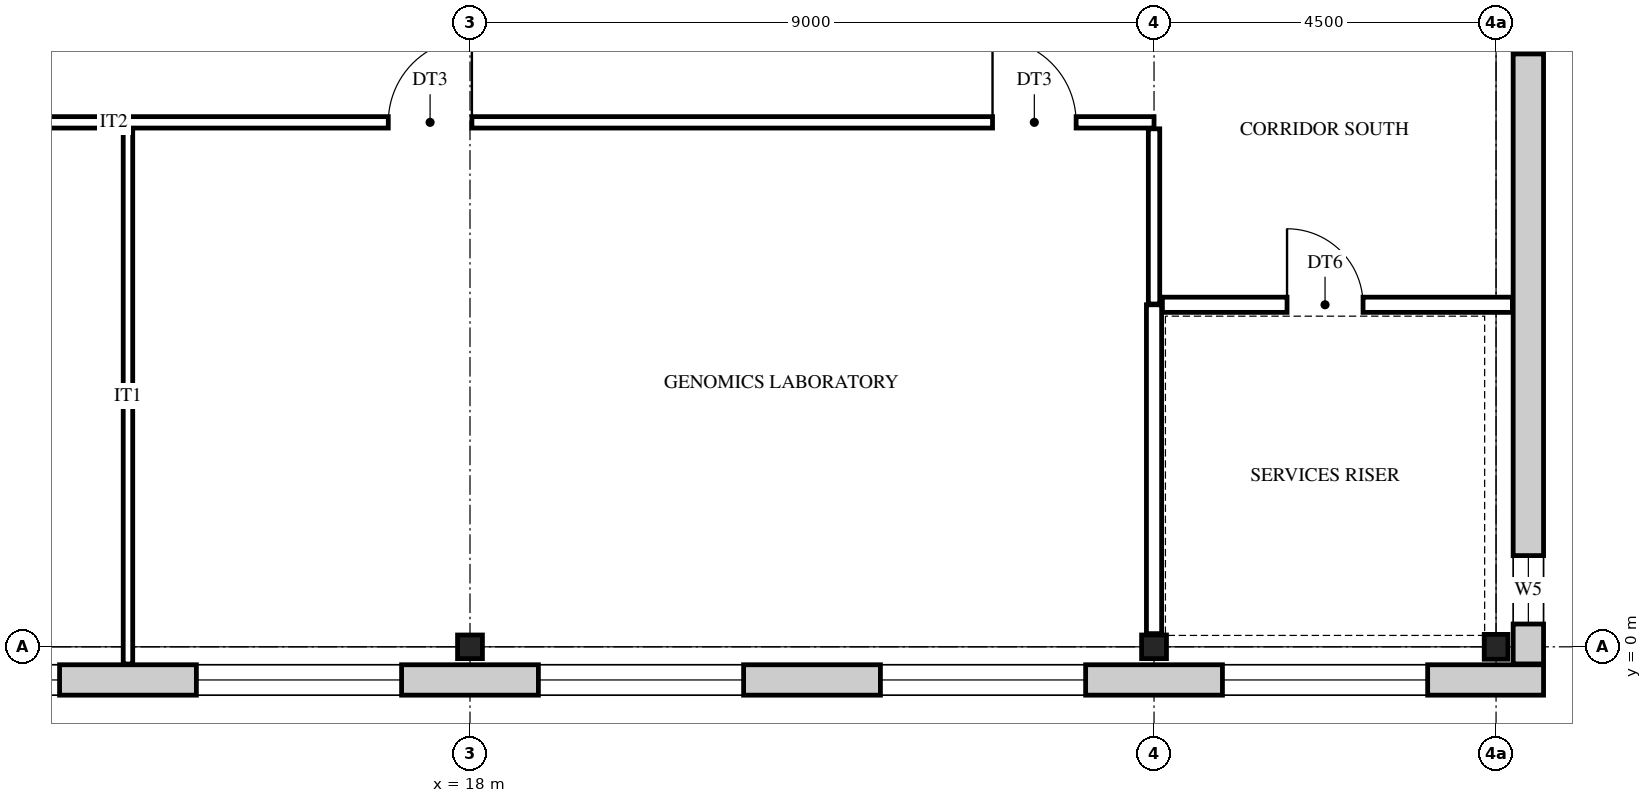
"""IFC4 building model, lengths in metres.
Left out: names, types, materials, properties, quantities, classifications, styles, units other than length and angle.
Written with IfcOpenShell. Run it as: python <this file> out.ifc"""

import sys

from ifc_helpers import new_model, si_unit, direction, frame, frame_2d, origin, origin_2d, place, context, subcontext, project, spatial, rectangle, i_section, extrude, element, fill, save


model = new_model("IFC4")
c1 = context("Model", 3, precision=1e-05, world=origin(), true_north=direction((0.0, 1.0)))
c2 = subcontext(c1, "Body", "Model", "MODEL_VIEW")
j1 = project(units=[si_unit("LENGTHUNIT", "METRE"), si_unit("PLANEANGLEUNIT", "RADIAN")], contexts=[c1])
p1 = place(None, origin())
s1 = spatial("IfcSite", under=j1, at=p1, CompositionType="ELEMENT")
p2 = place(p1, origin())
s2 = spatial("IfcBuilding", under=s1, at=p2, CompositionType="ELEMENT")
p3 = place(p2, frame((0.0, 0.0, 36.0)))
s3 = spatial("IfcBuildingStorey", under=s2, at=p3, CompositionType="ELEMENT", Elevation=36.0)
for number, where, z_axis, x_axis in (
    (1, (18.0, 0.0, 0.0), (0.0, 0.0, 1.0), (0.0, 1.0, 0.0)),
    (2, (27.0, 0.0, 0.0), (0.0, 0.0, 1.0), (0.0, 1.0, 0.0)),
    (3, (31.5, 0.0, 0.0), (0.0, 0.0, 1.0), (1.0, 0.0, 0.0)),
):
    element("IfcColumn", number, at=place(p3, frame(where, z_axis=z_axis, x_axis=x_axis)), inside=s3, PredefinedType="COLUMN", context=c2, shape_type="SweptSolid", body=[
        extrude(i_section(OverallWidth=0.311, OverallDepth=0.327, WebThickness=0.016, FlangeThickness=0.025, FilletRadius=0.017, at=origin_2d()), origin(), (0.0, 0.0, 1.0), 4.2),
    ])
p4 = place(p3, frame((32.125, -0.436, 0.0), z_axis=(0.0, 0.0, 1.0), x_axis=(-1.0, 0.0, 0.0)))
e4 = element("IfcWall", 4, at=p4, inside=s3, PredefinedType="STANDARD", context=c2, shape_type="SweptSolid", body=[
    extrude(rectangle(XDim=32.75, YDim=0.4, at=frame_2d((16.375, 0.0))), origin(), (0.0, 0.0, 1.0), 4.2),
])
p5 = place(p4, frame((28.525, 0.0, 0.9)))
e5 = element("IfcOpeningElement", 5, at=p5, cuts=e4, PredefinedType="OPENING", context=c2, shape_type="SweptSolid", body=[
    extrude(rectangle(XDim=2.7, YDim=2.5, at=frame_2d((1.35, 1.25))), frame((0.0, 0.21, 0.0), z_axis=(0.0, -1.0, 0.0), x_axis=(1.0, 0.0, 0.0)), (0.0, 0.0, 1.0), 0.42),
])
p6 = place(p4, frame((24.025, 0.0, 0.9)))
e6 = element("IfcOpeningElement", 6, at=p6, cuts=e4, PredefinedType="OPENING", context=c2, shape_type="SweptSolid", body=[
    extrude(rectangle(XDim=2.7, YDim=2.5, at=frame_2d((1.35, 1.25))), frame((0.0, 0.21, 0.0), z_axis=(0.0, -1.0, 0.0), x_axis=(1.0, 0.0, 0.0)), (0.0, 0.0, 1.0), 0.42),
])
p7 = place(p4, frame((19.525, 0.0, 0.9)))
e7 = element("IfcOpeningElement", 7, at=p7, cuts=e4, PredefinedType="OPENING", context=c2, shape_type="SweptSolid", body=[
    extrude(rectangle(XDim=2.7, YDim=2.5, at=frame_2d((1.35, 1.25))), frame((0.0, 0.21, 0.0), z_axis=(0.0, -1.0, 0.0), x_axis=(1.0, 0.0, 0.0)), (0.0, 0.0, 1.0), 0.42),
])
p8 = place(p4, frame((15.025, 0.0, 0.9)))
e8 = element("IfcOpeningElement", 8, at=p8, cuts=e4, PredefinedType="OPENING", context=c2, shape_type="SweptSolid", body=[
    extrude(rectangle(XDim=2.7, YDim=2.5, at=frame_2d((1.35, 1.25))), frame((0.0, 0.21, 0.0), z_axis=(0.0, -1.0, 0.0), x_axis=(1.0, 0.0, 0.0)), (0.0, 0.0, 1.0), 0.42),
])
p9 = place(p4, frame((10.525, 0.0, 0.9)))
e9 = element("IfcOpeningElement", 9, at=p9, cuts=e4, PredefinedType="OPENING", context=c2, shape_type="SweptSolid", body=[
    extrude(rectangle(XDim=2.7, YDim=2.5, at=frame_2d((1.35, 1.25))), frame((0.0, 0.21, 0.0), z_axis=(0.0, -1.0, 0.0), x_axis=(1.0, 0.0, 0.0)), (0.0, 0.0, 1.0), 0.42),
])
p10 = place(p4, frame((6.025, 0.0, 0.9)))
e10 = element("IfcOpeningElement", 10, at=p10, cuts=e4, PredefinedType="OPENING", context=c2, shape_type="SweptSolid", body=[
    extrude(rectangle(XDim=2.7, YDim=2.5, at=frame_2d((1.35, 1.25))), frame((0.0, 0.21, 0.0), z_axis=(0.0, -1.0, 0.0), x_axis=(1.0, 0.0, 0.0)), (0.0, 0.0, 1.0), 0.42),
])
p11 = place(p4, frame((1.525, 0.0, 0.9)))
e11 = element("IfcOpeningElement", 11, at=p11, cuts=e4, PredefinedType="OPENING", context=c2, shape_type="SweptSolid", body=[
    extrude(rectangle(XDim=2.7, YDim=2.5, at=frame_2d((1.35, 1.25))), frame((0.0, 0.21, 0.0), z_axis=(0.0, -1.0, 0.0), x_axis=(1.0, 0.0, 0.0)), (0.0, 0.0, 1.0), 0.42),
])
p12 = place(p3, frame((31.925, 27.225, 0.0), z_axis=(0.0, 0.0, 1.0), x_axis=(0.0, -1.0, 0.0)))
e12 = element("IfcWall", 12, at=p12, inside=s3, PredefinedType="STANDARD", context=c2, shape_type="SweptSolid", body=[
    extrude(rectangle(XDim=27.45, YDim=0.4, at=frame_2d((13.725, 0.0))), origin(), (0.0, 0.0, 1.0), 4.2),
])
p13 = place(p12, frame((26.025, 0.0, 0.9)))
e13 = element("IfcOpeningElement", 13, at=p13, cuts=e12, PredefinedType="OPENING", context=c2, shape_type="SweptSolid", body=[
    extrude(rectangle(XDim=0.9, YDim=2.0, at=frame_2d((0.45, 1.0))), frame((0.0, 0.21, 0.0), z_axis=(0.0, -1.0, 0.0), x_axis=(1.0, 0.0, 0.0)), (0.0, 0.0, 1.0), 0.42),
])
p14 = place(p12, frame((18.525, 0.0, 0.9)))
e14 = element("IfcOpeningElement", 14, at=p14, cuts=e12, PredefinedType="OPENING", context=c2, shape_type="SweptSolid", body=[
    extrude(rectangle(XDim=0.9, YDim=2.0, at=frame_2d((0.45, 1.0))), frame((0.0, 0.21, 0.0), z_axis=(0.0, -1.0, 0.0), x_axis=(1.0, 0.0, 0.0)), (0.0, 0.0, 1.0), 0.42),
])
p15 = place(p12, frame((15.675, 0.0, 1.6)))
e15 = element("IfcOpeningElement", 15, at=p15, cuts=e12, PredefinedType="OPENING", context=c2, shape_type="SweptSolid", body=[
    extrude(rectangle(XDim=0.6, YDim=0.9, at=frame_2d((0.3, 0.45))), frame((0.0, 0.21, 0.0), z_axis=(0.0, -1.0, 0.0), x_axis=(1.0, 0.0, 0.0)), (0.0, 0.0, 1.0), 0.42),
])
p16 = place(p12, frame((11.175, 0.0, 1.6)))
e16 = element("IfcOpeningElement", 16, at=p16, cuts=e12, PredefinedType="OPENING", context=c2, shape_type="SweptSolid", body=[
    extrude(rectangle(XDim=0.6, YDim=0.9, at=frame_2d((0.3, 0.45))), frame((0.0, 0.21, 0.0), z_axis=(0.0, -1.0, 0.0), x_axis=(1.0, 0.0, 0.0)), (0.0, 0.0, 1.0), 0.42),
])
p17 = place(p12, frame((8.025, 0.0, 0.9)))
e17 = element("IfcOpeningElement", 17, at=p17, cuts=e12, PredefinedType="OPENING", context=c2, shape_type="SweptSolid", body=[
    extrude(rectangle(XDim=0.9, YDim=2.0, at=frame_2d((0.45, 1.0))), frame((0.0, 0.21, 0.0), z_axis=(0.0, -1.0, 0.0), x_axis=(1.0, 0.0, 0.0)), (0.0, 0.0, 1.0), 0.42),
])
p18 = place(p12, frame((0.525, 0.0, 0.9)))
e18 = element("IfcOpeningElement", 18, at=p18, cuts=e12, PredefinedType="OPENING", context=c2, shape_type="SweptSolid", body=[
    extrude(rectangle(XDim=0.9, YDim=2.0, at=frame_2d((0.45, 1.0))), frame((0.0, 0.21, 0.0), z_axis=(0.0, -1.0, 0.0), x_axis=(1.0, 0.0, 0.0)), (0.0, 0.0, 1.0), 0.42),
])
p19 = place(p3, frame((13.5, -0.226, 0.0), z_axis=(0.0, 0.0, 1.0), x_axis=(0.0, 1.0, 0.0)))
e19 = element("IfcWall", 19, at=p19, inside=s3, PredefinedType="PARTITIONING", context=c2, shape_type="SweptSolid", body=[
    extrude(rectangle(XDim=7.041, YDim=0.125, at=frame_2d((3.521, 0.0))), origin(), (0.0, 0.0, 1.0), 3.537),
])
p20 = place(p3, frame((27.0, 0.174, 0.0), z_axis=(0.0, 0.0, 1.0), x_axis=(0.0, 1.0, 0.0)))
e20 = element("IfcWall", 20, at=p20, inside=s3, PredefinedType="PARTITIONING", context=c2, shape_type="SweptSolid", body=[
    extrude(rectangle(XDim=4.326, YDim=0.2, at=frame_2d((2.163, 0.0))), origin(), (0.0, 0.0, 1.0), 3.537),
])
p21 = place(p3, frame((27.0, 4.51, 0.0), z_axis=(0.0, 0.0, 1.0), x_axis=(0.0, 1.0, 0.0)))
e21 = element("IfcWall", 21, at=p21, inside=s3, PredefinedType="PARTITIONING", context=c2, shape_type="SweptSolid", body=[
    extrude(rectangle(XDim=2.305, YDim=0.15, at=frame_2d((1.152, 0.0))), origin(), (0.0, 0.0, 1.0), 3.537),
])
p22 = place(p3, frame((27.11, 4.5, 0.0), z_axis=(0.0, 0.0, 1.0), x_axis=(1.0, 0.0, 0.0)))
e22 = element("IfcWall", 22, at=p22, inside=s3, PredefinedType="PARTITIONING", context=c2, shape_type="SweptSolid", body=[
    extrude(rectangle(XDim=4.605, YDim=0.2, at=frame_2d((2.302, 0.0))), origin(), (0.0, 0.0, 1.0), 3.537),
])
p23 = place(p22, frame((1.64, 0.0, 0.0)))
e23 = element("IfcOpeningElement", 23, at=p23, cuts=e22, PredefinedType="OPENING", context=c2, shape_type="SweptSolid", body=[
    extrude(rectangle(XDim=1.0, YDim=2.1, at=frame_2d((0.5, 1.05))), frame((0.0, 0.11, 0.0), z_axis=(0.0, -1.0, 0.0), x_axis=(1.0, 0.0, 0.0)), (0.0, 0.0, 1.0), 0.22),
])
p24 = place(p3, frame((6.9, 6.9, 0.0), z_axis=(0.0, 0.0, 1.0), x_axis=(1.0, 0.0, 0.0)))
e24 = element("IfcWall", 24, at=p24, inside=s3, PredefinedType="PARTITIONING", context=c2, shape_type="SweptSolid", body=[
    extrude(rectangle(XDim=20.1, YDim=0.15, at=frame_2d((10.05, 0.0))), origin(), (0.0, 0.0, 1.0), 3.537),
])
p25 = place(p24, frame((1.7, 0.0, 0.0)))
e25 = element("IfcOpeningElement", 25, at=p25, cuts=e24, PredefinedType="OPENING", context=c2, shape_type="SweptSolid", body=[
    extrude(rectangle(XDim=1.1, YDim=2.1, at=frame_2d((0.55, 1.05))), frame((0.0, 0.085, 0.0), z_axis=(0.0, -1.0, 0.0), x_axis=(1.0, 0.0, 0.0)), (0.0, 0.0, 1.0), 0.17),
])
p26 = place(p24, frame((17.975, 0.0, 0.0)))
e26 = element("IfcOpeningElement", 26, at=p26, cuts=e24, PredefinedType="OPENING", context=c2, shape_type="SweptSolid", body=[
    extrude(rectangle(XDim=1.1, YDim=2.1, at=frame_2d((0.55, 1.05))), frame((0.0, 0.085, 0.0), z_axis=(0.0, -1.0, 0.0), x_axis=(1.0, 0.0, 0.0)), (0.0, 0.0, 1.0), 0.17),
])
p27 = place(p24, frame((10.025, 0.0, 0.0)))
e27 = element("IfcOpeningElement", 27, at=p27, cuts=e24, PredefinedType="OPENING", context=c2, shape_type="SweptSolid", body=[
    extrude(rectangle(XDim=1.1, YDim=2.1, at=frame_2d((0.55, 1.05))), frame((0.0, 0.085, 0.0), z_axis=(0.0, -1.0, 0.0), x_axis=(1.0, 0.0, 0.0)), (0.0, 0.0, 1.0), 0.17),
])
p28 = place(p7, origin())
e28 = element("IfcWindow", 28, at=p28, inside=s3, PartitioningType="SINGLE_PANEL", PredefinedType="WINDOW", context=c2, shape_type="SweptSolid", body=[
    extrude(rectangle(XDim=2.7, YDim=2.5, at=frame_2d((1.35, 1.25))), frame((0.0, 0.03, 0.0), z_axis=(0.0, -1.0, 0.0), x_axis=(1.0, 0.0, 0.0)), (0.0, 0.0, 1.0), 0.06),
])
fill(e7, e28)
p29 = place(p8, origin())
e29 = element("IfcWindow", 29, at=p29, inside=s3, PartitioningType="SINGLE_PANEL", PredefinedType="WINDOW", context=c2, shape_type="SweptSolid", body=[
    extrude(rectangle(XDim=2.7, YDim=2.5, at=frame_2d((1.35, 1.25))), frame((0.0, 0.03, 0.0), z_axis=(0.0, -1.0, 0.0), x_axis=(1.0, 0.0, 0.0)), (0.0, 0.0, 1.0), 0.06),
])
fill(e8, e29)
p30 = place(p9, origin())
e30 = element("IfcWindow", 30, at=p30, inside=s3, PartitioningType="SINGLE_PANEL", PredefinedType="WINDOW", context=c2, shape_type="SweptSolid", body=[
    extrude(rectangle(XDim=2.7, YDim=2.5, at=frame_2d((1.35, 1.25))), frame((0.0, 0.03, 0.0), z_axis=(0.0, -1.0, 0.0), x_axis=(1.0, 0.0, 0.0)), (0.0, 0.0, 1.0), 0.06),
])
fill(e9, e30)
p31 = place(p10, origin())
e31 = element("IfcWindow", 31, at=p31, inside=s3, PartitioningType="SINGLE_PANEL", PredefinedType="WINDOW", context=c2, shape_type="SweptSolid", body=[
    extrude(rectangle(XDim=2.7, YDim=2.5, at=frame_2d((1.35, 1.25))), frame((0.0, 0.03, 0.0), z_axis=(0.0, -1.0, 0.0), x_axis=(1.0, 0.0, 0.0)), (0.0, 0.0, 1.0), 0.06),
])
fill(e10, e31)
p32 = place(p11, origin())
e32 = element("IfcWindow", 32, at=p32, inside=s3, PartitioningType="SINGLE_PANEL", PredefinedType="WINDOW", context=c2, shape_type="SweptSolid", body=[
    extrude(rectangle(XDim=2.7, YDim=2.5, at=frame_2d((1.35, 1.25))), frame((0.0, 0.03, 0.0), z_axis=(0.0, -1.0, 0.0), x_axis=(1.0, 0.0, 0.0)), (0.0, 0.0, 1.0), 0.06),
])
fill(e11, e32)
p33 = place(p13, origin())
e33 = element("IfcWindow", 33, at=p33, inside=s3, PartitioningType="SINGLE_PANEL", PredefinedType="WINDOW", context=c2, shape_type="SweptSolid", body=[
    extrude(rectangle(XDim=0.9, YDim=2.0, at=frame_2d((0.45, 1.0))), frame((0.0, 0.03, 0.0), z_axis=(0.0, -1.0, 0.0), x_axis=(1.0, 0.0, 0.0)), (0.0, 0.0, 1.0), 0.06),
])
fill(e13, e33)
p34 = place(p14, origin())
e34 = element("IfcWindow", 34, at=p34, inside=s3, PartitioningType="SINGLE_PANEL", PredefinedType="WINDOW", context=c2, shape_type="SweptSolid", body=[
    extrude(rectangle(XDim=0.9, YDim=2.0, at=frame_2d((0.45, 1.0))), frame((0.0, 0.03, 0.0), z_axis=(0.0, -1.0, 0.0), x_axis=(1.0, 0.0, 0.0)), (0.0, 0.0, 1.0), 0.06),
])
fill(e14, e34)
p35 = place(p23, frame((1.0, 0.0, 0.0), z_axis=(0.0, 0.0, 1.0), x_axis=(-1.0, 0.0, 0.0)))
e35 = element("IfcDoor", 35, at=p35, inside=s3, OperationType="SINGLE_SWING_LEFT", PredefinedType="DOOR", context=c2, shape_type="SweptSolid", body=[
    extrude(rectangle(XDim=1.0, YDim=2.1, at=frame_2d((0.5, 1.05))), frame((0.0, 0.025, 0.0), z_axis=(0.0, -1.0, 0.0), x_axis=(1.0, 0.0, 0.0)), (0.0, 0.0, 1.0), 0.05),
])
fill(e23, e35)
p36 = place(p26, frame((1.1, 0.0, 0.0), z_axis=(0.0, 0.0, 1.0), x_axis=(-1.0, 0.0, 0.0)))
e36 = element("IfcDoor", 36, at=p36, inside=s3, OperationType="SINGLE_SWING_LEFT", PredefinedType="DOOR", context=c2, shape_type="SweptSolid", body=[
    extrude(rectangle(XDim=1.1, YDim=2.1, at=frame_2d((0.55, 1.05))), frame((0.0, 0.025, 0.0), z_axis=(0.0, -1.0, 0.0), x_axis=(1.0, 0.0, 0.0)), (0.0, 0.0, 1.0), 0.05),
])
fill(e26, e36)
p37 = place(p27, frame((1.1, 0.0, 0.0), z_axis=(0.0, 0.0, 1.0), x_axis=(-1.0, 0.0, 0.0)))
e37 = element("IfcDoor", 37, at=p37, inside=s3, OperationType="SINGLE_SWING_RIGHT", PredefinedType="DOOR", context=c2, shape_type="SweptSolid", body=[
    extrude(rectangle(XDim=1.1, YDim=2.1, at=frame_2d((0.55, 1.05))), frame((0.0, 0.025, 0.0), z_axis=(0.0, -1.0, 0.0), x_axis=(1.0, 0.0, 0.0)), (0.0, 0.0, 1.0), 0.05),
])
fill(e27, e37)
save(model, sys.argv[1])
